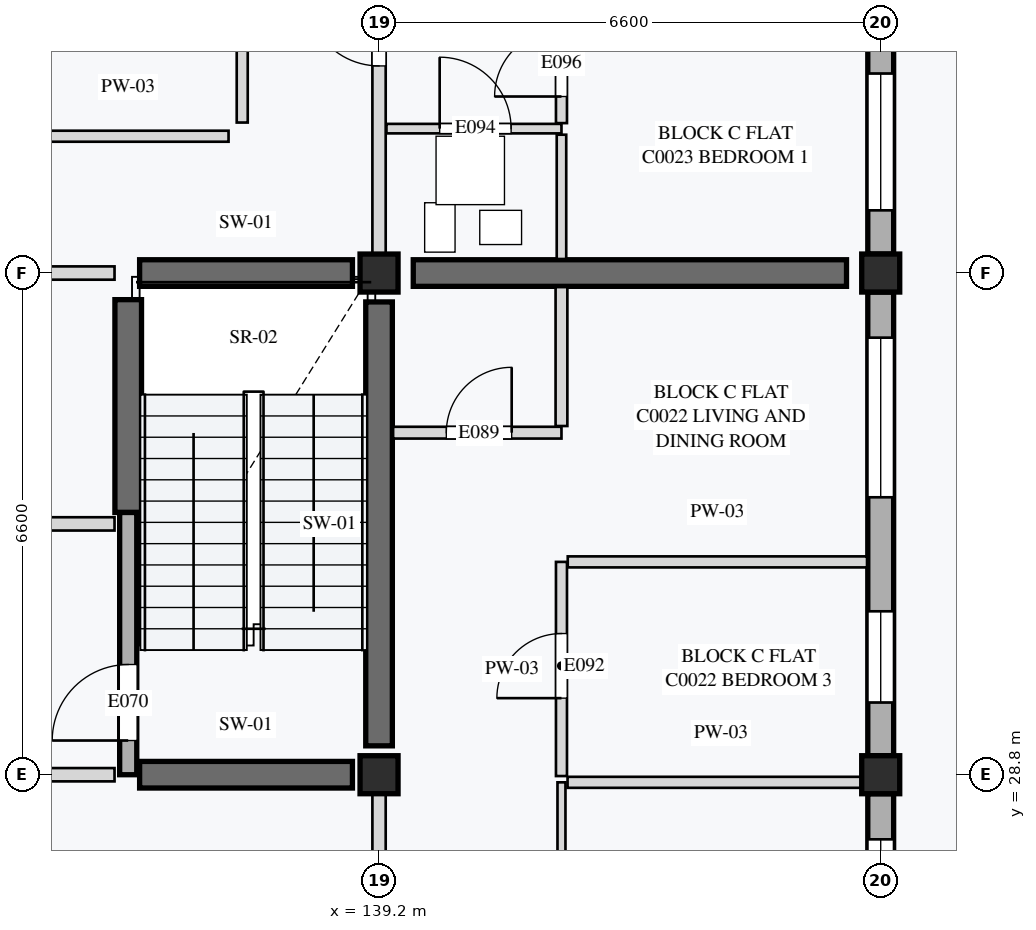
"""IFC4 building model, lengths in metres.
Left out: names, types, materials, properties, quantities, classifications, styles, units other than length and angle.
Written with IfcOpenShell. Run it as: python <this file> out.ifc"""

import sys

from ifc_helpers import new_model, si_unit, direction, frame, frame_2d, origin, origin_2d, place, context, subcontext, project, spatial, rectangle, extrude, element, fill, save


model = new_model("IFC4")
c1 = context("Model", 3, precision=1e-05, world=origin(), true_north=direction((0.0, 1.0)))
c2 = subcontext(c1, "Body", "Model", "MODEL_VIEW")
j1 = project(units=[si_unit("LENGTHUNIT", "METRE"), si_unit("PLANEANGLEUNIT", "RADIAN")], contexts=[c1])
p1 = place(None, origin())
s1 = spatial("IfcSite", under=j1, at=p1, CompositionType="ELEMENT")
p2 = place(p1, origin())
s2 = spatial("IfcBuilding", under=s1, at=p2, CompositionType="ELEMENT")
p3 = place(p2, origin())
s3 = spatial("IfcBuildingStorey", under=s2, at=p3, CompositionType="ELEMENT", Elevation=0.0)
for number, where, z_axis, x_axis in (
    (1, (139.2, 28.8, 0.0), (0.0, 0.0, 1.0), (1.0, 0.0, 0.0)),
    (2, (145.8, 28.8, 0.0), (0.0, 0.0, 1.0), (1.0, 0.0, 0.0)),
    (3, (139.2, 35.4, 0.0), (0.0, 0.0, 1.0), (1.0, 0.0, 0.0)),
    (4, (145.8, 35.4, 0.0), (0.0, 0.0, 1.0), (1.0, 0.0, 0.0)),
):
    element("IfcColumn", number, at=place(p3, frame(where, z_axis=z_axis, x_axis=x_axis)), inside=s3, PredefinedType="COLUMN", context=c2, shape_type="SweptSolid", body=[
        extrude(rectangle(XDim=0.5, YDim=0.5, at=origin_2d()), origin(), (0.0, 0.0, 1.0), 4.2),
    ])
p4 = place(p3, frame((139.2, 29.18, 0.0), z_axis=(0.0, 0.0, 1.0), x_axis=(0.0, 1.0, 0.0)))
e5 = element("IfcWall", 5, at=p4, inside=s3, PredefinedType="SHEAR", context=c2, shape_type="SweptSolid", body=[
    extrude(rectangle(XDim=5.84, YDim=0.35, at=frame_2d((2.92, 0.0))), origin(), (0.0, 0.0, 1.0), 3.92),
])
for number, where, z_axis, x_axis in (
    (6, (135.9, 32.25, 0.0), (0.0, 0.0, 1.0), (0.0, 1.0, 0.0)),
    (7, (136.05, 28.8, 0.0), (0.0, 0.0, 1.0), (1.0, 0.0, 0.0)),
    (8, (136.05, 35.4, 0.0), (0.0, 0.0, 1.0), (1.0, 0.0, 0.0)),
):
    element("IfcWall", number, at=place(p3, frame(where, z_axis=z_axis, x_axis=x_axis)), inside=s3, PredefinedType="SHEAR", context=c2, shape_type="SweptSolid", body=[
        extrude(rectangle(XDim=2.8, YDim=0.35, at=frame_2d((1.4, 0.0))), origin(), (0.0, 0.0, 1.0), 3.92),
    ])
p5 = place(p3, frame((139.65, 35.4, 0.0), z_axis=(0.0, 0.0, 1.0), x_axis=(1.0, 0.0, 0.0)))
e9 = element("IfcWall", 9, at=p5, inside=s3, PredefinedType="SHEAR", context=c2, shape_type="SweptSolid", body=[
    extrude(rectangle(XDim=5.7, YDim=0.35, at=frame_2d((2.85, 0.0))), origin(), (0.0, 0.0, 1.0), 3.92),
])
p6 = place(p3, frame((145.8, 22.45, 0.0), z_axis=(0.0, 0.0, 1.0), x_axis=(0.0, 1.0, 0.0)))
e10 = element("IfcWall", 10, at=p6, inside=s3, PredefinedType="STANDARD", context=c2, shape_type="SweptSolid", body=[
    extrude(rectangle(XDim=6.1, YDim=0.34, at=frame_2d((3.05, 0.0))), origin(), (0.0, 0.0, 1.0), 3.6),
])
p7 = place(p6, frame((0.6, 0.0, 0.85)))
e11 = element("IfcOpeningElement", 11, at=p7, cuts=e10, PredefinedType="OPENING", context=c2, shape_type="SweptSolid", body=[
    extrude(rectangle(XDim=1.8, YDim=1.35, at=frame_2d((0.9, 0.675))), frame((0.0, 0.18, 0.0), z_axis=(0.0, -1.0, 0.0), x_axis=(1.0, 0.0, 0.0)), (0.0, 0.0, 1.0), 0.36),
])
p8 = place(p6, frame((4.0, 0.0, 0.85)))
e12 = element("IfcOpeningElement", 12, at=p8, cuts=e10, PredefinedType="OPENING", context=c2, shape_type="SweptSolid", body=[
    extrude(rectangle(XDim=1.5, YDim=1.35, at=frame_2d((0.75, 0.675))), frame((0.0, 0.18, 0.0), z_axis=(0.0, -1.0, 0.0), x_axis=(1.0, 0.0, 0.0)), (0.0, 0.0, 1.0), 0.36),
])
p9 = place(p3, frame((145.8, 29.05, 0.0), z_axis=(0.0, 0.0, 1.0), x_axis=(0.0, 1.0, 0.0)))
e13 = element("IfcWall", 13, at=p9, inside=s3, PredefinedType="STANDARD", context=c2, shape_type="SweptSolid", body=[
    extrude(rectangle(XDim=6.1, YDim=0.34, at=frame_2d((3.05, 0.0))), origin(), (0.0, 0.0, 1.0), 3.6),
])
p10 = place(p9, frame((0.7, 0.0, 0.85)))
e14 = element("IfcOpeningElement", 14, at=p10, cuts=e13, PredefinedType="OPENING", context=c2, shape_type="SweptSolid", body=[
    extrude(rectangle(XDim=1.2, YDim=1.35, at=frame_2d((0.6, 0.675))), frame((0.0, 0.18, 0.0), z_axis=(0.0, -1.0, 0.0), x_axis=(1.0, 0.0, 0.0)), (0.0, 0.0, 1.0), 0.36),
])
p11 = place(p9, frame((3.4, 0.0, 0.85)))
e15 = element("IfcOpeningElement", 15, at=p11, cuts=e13, PredefinedType="OPENING", context=c2, shape_type="SweptSolid", body=[
    extrude(rectangle(XDim=2.1, YDim=1.55, at=frame_2d((1.05, 0.775))), frame((0.0, 0.18, 0.0), z_axis=(0.0, -1.0, 0.0), x_axis=(1.0, 0.0, 0.0)), (0.0, 0.0, 1.0), 0.36),
])
p12 = place(p3, frame((145.8, 35.65, 0.0), z_axis=(0.0, 0.0, 1.0), x_axis=(0.0, 1.0, 0.0)))
e16 = element("IfcWall", 16, at=p12, inside=s3, PredefinedType="STANDARD", context=c2, shape_type="SweptSolid", body=[
    extrude(rectangle(XDim=6.1, YDim=0.34, at=frame_2d((3.05, 0.0))), origin(), (0.0, 0.0, 1.0), 3.6),
])
p13 = place(p12, frame((0.575, 0.0, 0.85)))
e17 = element("IfcOpeningElement", 17, at=p13, cuts=e16, PredefinedType="OPENING", context=c2, shape_type="SweptSolid", body=[
    extrude(rectangle(XDim=1.8, YDim=1.35, at=frame_2d((0.9, 0.675))), frame((0.0, 0.18, 0.0), z_axis=(0.0, -1.0, 0.0), x_axis=(1.0, 0.0, 0.0)), (0.0, 0.0, 1.0), 0.36),
])
p14 = place(p12, frame((3.875, 0.0, 0.85)))
e18 = element("IfcOpeningElement", 18, at=p14, cuts=e16, PredefinedType="OPENING", context=c2, shape_type="SweptSolid", body=[
    extrude(rectangle(XDim=1.8, YDim=1.55, at=frame_2d((0.9, 0.775))), frame((0.0, 0.18, 0.0), z_axis=(0.0, -1.0, 0.0), x_axis=(1.0, 0.0, 0.0)), (0.0, 0.0, 1.0), 0.36),
])
p15 = place(p3, frame((135.9, 28.8, 0.0), z_axis=(0.0, 0.0, 1.0), x_axis=(0.0, 1.0, 0.0)))
e19 = element("IfcWall", 19, at=p15, inside=s3, PredefinedType="STANDARD", context=c2, shape_type="SweptSolid", body=[
    extrude(rectangle(XDim=3.45, YDim=0.225, at=frame_2d((1.725, 0.0))), origin(), (0.0, 0.0, 1.0), 3.92),
])
p16 = place(p15, frame((0.45, 0.0, 0.0)))
e20 = element("IfcOpeningElement", 20, at=p16, cuts=e19, PredefinedType="OPENING", context=c2, shape_type="SweptSolid", body=[
    extrude(rectangle(XDim=1.0, YDim=2.16, at=frame_2d((0.5, 1.08))), frame((0.0, 0.123, 0.0), z_axis=(0.0, -1.0, 0.0), x_axis=(1.0, 0.0, 0.0)), (0.0, 0.0, 1.0), 0.245),
])
p17 = place(p3, frame((134.58, 28.8, 0.0), z_axis=(0.0, 0.0, 1.0), x_axis=(1.0, 0.0, 0.0)))
e21 = element("IfcWall", 21, at=p17, inside=s3, PredefinedType="PARTITIONING", context=c2, shape_type="SweptSolid", body=[
    extrude(rectangle(XDim=1.14, YDim=0.175, at=frame_2d((0.57, 0.0))), origin(), (0.0, 0.0, 1.0), 3.75),
])
for number, where, z_axis, x_axis in (
    (22, (134.58, 32.1, 0.0), (0.0, 0.0, 1.0), (1.0, 0.0, 0.0)),
    (23, (134.58, 35.4, 0.0), (0.0, 0.0, 1.0), (1.0, 0.0, 0.0)),
):
    element("IfcWall", number, at=place(p3, frame(where, z_axis=z_axis, x_axis=x_axis)), inside=s3, PredefinedType="PARTITIONING", context=c2, shape_type="SweptSolid", body=[
        extrude(rectangle(XDim=1.14, YDim=0.175, at=frame_2d((0.57, 0.0))), origin(), (0.0, 0.0, 1.0), 3.92),
    ])
p18 = place(p3, frame((137.4, 37.38, 0.0), z_axis=(0.0, 0.0, 1.0), x_axis=(0.0, 1.0, 0.0)))
e24 = element("IfcWall", 24, at=p18, inside=s3, PredefinedType="PARTITIONING", context=c2, shape_type="SweptSolid", body=[
    extrude(rectangle(XDim=4.6, YDim=0.145, at=frame_2d((2.3, 0.0))), origin(), (0.0, 0.0, 1.0), 3.92),
])
p19 = place(p3, frame((134.58, 37.2, 0.0), z_axis=(0.0, 0.0, 1.0), x_axis=(1.0, 0.0, 0.0)))
e25 = element("IfcWall", 25, at=p19, inside=s3, PredefinedType="PARTITIONING", context=c2, shape_type="SweptSolid", body=[
    extrude(rectangle(XDim=2.64, YDim=0.145, at=frame_2d((1.32, 0.0))), origin(), (0.0, 0.0, 1.0), 3.92),
])
p20 = place(p3, frame((139.2, 22.2, 0.0), z_axis=(0.0, 0.0, 1.0), x_axis=(0.0, 1.0, 0.0)))
e26 = element("IfcWall", 26, at=p20, inside=s3, PredefinedType="PARTITIONING", context=c2, shape_type="SweptSolid", body=[
    extrude(rectangle(XDim=6.6, YDim=0.175, at=frame_2d((3.3, 0.0))), origin(), (0.0, 0.0, 1.0), 3.55),
])
p21 = place(p20, frame((3.85, 0.0, 0.0)))
e27 = element("IfcOpeningElement", 27, at=p21, cuts=e26, PredefinedType="OPENING", context=c2, shape_type="SweptSolid", body=[
    extrude(rectangle(XDim=0.92, YDim=2.14, at=frame_2d((0.46, 1.07))), frame((0.0, 0.097, 0.0), z_axis=(0.0, -1.0, 0.0), x_axis=(1.0, 0.0, 0.0)), (0.0, 0.0, 1.0), 0.195),
])
p22 = place(p3, frame((139.385, 33.3, 0.0), z_axis=(0.0, 0.0, 1.0), x_axis=(1.0, 0.0, 0.0)))
e28 = element("IfcWall", 28, at=p22, inside=s3, PredefinedType="PARTITIONING", context=c2, shape_type="SweptSolid", body=[
    extrude(rectangle(XDim=2.215, YDim=0.155, at=frame_2d((1.107, 0.0))), origin(), (0.0, 0.0, 1.0), 3.92),
])
p23 = place(p22, frame((0.7, 0.0, 0.0)))
e29 = element("IfcOpeningElement", 29, at=p23, cuts=e28, PredefinedType="OPENING", context=c2, shape_type="SweptSolid", body=[
    extrude(rectangle(XDim=0.86, YDim=2.12, at=frame_2d((0.43, 1.06))), frame((0.0, 0.087, 0.0), z_axis=(0.0, -1.0, 0.0), x_axis=(1.0, 0.0, 0.0)), (0.0, 0.0, 1.0), 0.175),
])
p24 = place(p3, frame((141.6, 33.387, 0.0), z_axis=(0.0, 0.0, 1.0), x_axis=(0.0, 1.0, 0.0)))
e30 = element("IfcWall", 30, at=p24, inside=s3, PredefinedType="PARTITIONING", context=c2, shape_type="SweptSolid", body=[
    extrude(rectangle(XDim=1.828, YDim=0.155, at=frame_2d((0.914, 0.0))), origin(), (0.0, 0.0, 1.0), 3.92),
])
p25 = place(p3, frame((141.6, 25.7, 0.0), z_axis=(0.0, 0.0, 1.0), x_axis=(0.0, 1.0, 0.0)))
e31 = element("IfcWall", 31, at=p25, inside=s3, PredefinedType="PARTITIONING", context=c2, shape_type="SweptSolid", body=[
    extrude(rectangle(XDim=3.0, YDim=0.105, at=frame_2d((1.5, 0.0))), origin(), (0.0, 0.0, 1.0), 3.92),
])
p26 = place(p25, frame((1.075, 0.0, 0.0)))
e32 = element("IfcOpeningElement", 32, at=p26, cuts=e31, PredefinedType="OPENING", context=c2, shape_type="SweptSolid", body=[
    extrude(rectangle(XDim=0.87, YDim=2.08, at=frame_2d((0.435, 1.04))), frame((0.0, 0.062, 0.0), z_axis=(0.0, -1.0, 0.0), x_axis=(1.0, 0.0, 0.0)), (0.0, 0.0, 1.0), 0.125),
])
p27 = place(p3, frame((141.68, 28.7, 0.0), z_axis=(0.0, 0.0, 1.0), x_axis=(1.0, 0.0, 0.0)))
e33 = element("IfcWall", 33, at=p27, inside=s3, PredefinedType="PARTITIONING", context=c2, shape_type="SweptSolid", body=[
    extrude(rectangle(XDim=4.04, YDim=0.145, at=frame_2d((2.02, 0.0))), origin(), (0.0, 0.0, 1.0), 3.75),
])
p28 = place(p3, frame((141.6, 28.782, 0.0), z_axis=(0.0, 0.0, 1.0), x_axis=(0.0, 1.0, 0.0)))
e34 = element("IfcWall", 34, at=p28, inside=s3, PredefinedType="PARTITIONING", context=c2, shape_type="SweptSolid", body=[
    extrude(rectangle(XDim=2.818, YDim=0.145, at=frame_2d((1.409, 0.0))), origin(), (0.0, 0.0, 1.0), 3.92),
])
p29 = place(p28, frame((1.025, 0.0, 0.0)))
e35 = element("IfcOpeningElement", 35, at=p29, cuts=e34, PredefinedType="OPENING", context=c2, shape_type="SweptSolid", body=[
    extrude(rectangle(XDim=0.85, YDim=2.1, at=frame_2d((0.425, 1.05))), frame((0.0, 0.083, 0.0), z_axis=(0.0, -1.0, 0.0), x_axis=(1.0, 0.0, 0.0)), (0.0, 0.0, 1.0), 0.165),
])
p30 = place(p3, frame((141.683, 31.6, 0.0), z_axis=(0.0, 0.0, 1.0), x_axis=(1.0, 0.0, 0.0)))
e36 = element("IfcWall", 36, at=p30, inside=s3, PredefinedType="PARTITIONING", context=c2, shape_type="SweptSolid", body=[
    extrude(rectangle(XDim=3.938, YDim=0.145, at=frame_2d((1.969, 0.0))), origin(), (0.0, 0.0, 1.0), 3.92),
])
p31 = place(p3, frame((139.2, 35.4, 0.0), z_axis=(0.0, 0.0, 1.0), x_axis=(0.0, 1.0, 0.0)))
e37 = element("IfcWall", 37, at=p31, inside=s3, PredefinedType="PARTITIONING", context=c2, shape_type="SweptSolid", body=[
    extrude(rectangle(XDim=6.6, YDim=0.175, at=frame_2d((3.3, 0.0))), origin(), (0.0, 0.0, 1.0), 3.55),
])
p32 = place(p31, frame((2.725, 0.0, 0.0)))
e38 = element("IfcOpeningElement", 38, at=p32, cuts=e37, PredefinedType="OPENING", context=c2, shape_type="SweptSolid", body=[
    extrude(rectangle(XDim=0.95, YDim=2.1, at=frame_2d((0.475, 1.05))), frame((0.0, 0.097, 0.0), z_axis=(0.0, -1.0, 0.0), x_axis=(1.0, 0.0, 0.0)), (0.0, 0.0, 1.0), 0.195),
])
p33 = place(p3, frame((139.298, 37.3, 0.0), z_axis=(0.0, 0.0, 1.0), x_axis=(1.0, 0.0, 0.0)))
e39 = element("IfcWall", 39, at=p33, inside=s3, PredefinedType="PARTITIONING", context=c2, shape_type="SweptSolid", body=[
    extrude(rectangle(XDim=2.302, YDim=0.125, at=frame_2d((1.151, 0.0))), origin(), (0.0, 0.0, 1.0), 3.92),
])
p34 = place(p33, frame((0.7, 0.0, 0.0)))
e40 = element("IfcOpeningElement", 40, at=p34, cuts=e39, PredefinedType="OPENING", context=c2, shape_type="SweptSolid", body=[
    extrude(rectangle(XDim=0.94, YDim=2.08, at=frame_2d((0.47, 1.04))), frame((0.0, 0.073, 0.0), z_axis=(0.0, -1.0, 0.0), x_axis=(1.0, 0.0, 0.0)), (0.0, 0.0, 1.0), 0.145),
])
p35 = place(p3, frame((141.6, 35.585, 0.0), z_axis=(0.0, 0.0, 1.0), x_axis=(0.0, 1.0, 0.0)))
e41 = element("IfcWall", 41, at=p35, inside=s3, PredefinedType="PARTITIONING", context=c2, shape_type="SweptSolid", body=[
    extrude(rectangle(XDim=1.635, YDim=0.125, at=frame_2d((0.817, 0.0))), origin(), (0.0, 0.0, 1.0), 3.92),
])
p36 = place(p3, frame((141.6, 37.373, 0.0), z_axis=(0.0, 0.0, 1.0), x_axis=(0.0, 1.0, 0.0)))
e42 = element("IfcWall", 42, at=p36, inside=s3, PredefinedType="PARTITIONING", context=c2, shape_type="SweptSolid", body=[
    extrude(rectangle(XDim=1.478, YDim=0.145, at=frame_2d((0.739, 0.0))), origin(), (0.0, 0.0, 1.0), 3.92),
])
p37 = place(p36, frame((0.35, 0.0, 0.0)))
e43 = element("IfcOpeningElement", 43, at=p37, cuts=e42, PredefinedType="OPENING", context=c2, shape_type="SweptSolid", body=[
    extrude(rectangle(XDim=0.88, YDim=2.1, at=frame_2d((0.44, 1.05))), frame((0.0, 0.083, 0.0), z_axis=(0.0, -1.0, 0.0), x_axis=(1.0, 0.0, 0.0)), (0.0, 0.0, 1.0), 0.165),
])
p38 = place(p8, origin())
e44 = element("IfcWindow", 44, at=p38, inside=s3, PartitioningType="SINGLE_PANEL", PredefinedType="WINDOW", context=c2, shape_type="SweptSolid", body=[
    extrude(rectangle(XDim=1.5, YDim=1.35, at=frame_2d((0.75, 0.675))), frame((0.0, 0.03, 0.0), z_axis=(0.0, -1.0, 0.0), x_axis=(1.0, 0.0, 0.0)), (0.0, 0.0, 1.0), 0.06),
])
fill(e12, e44)
p39 = place(p10, origin())
e45 = element("IfcWindow", 45, at=p39, inside=s3, PartitioningType="SINGLE_PANEL", PredefinedType="WINDOW", context=c2, shape_type="SweptSolid", body=[
    extrude(rectangle(XDim=1.2, YDim=1.35, at=frame_2d((0.6, 0.675))), frame((0.0, 0.03, 0.0), z_axis=(0.0, -1.0, 0.0), x_axis=(1.0, 0.0, 0.0)), (0.0, 0.0, 1.0), 0.06),
])
fill(e14, e45)
p40 = place(p11, origin())
e46 = element("IfcWindow", 46, at=p40, inside=s3, PartitioningType="SINGLE_PANEL", PredefinedType="WINDOW", context=c2, shape_type="SweptSolid", body=[
    extrude(rectangle(XDim=2.1, YDim=1.55, at=frame_2d((1.05, 0.775))), frame((0.0, 0.03, 0.0), z_axis=(0.0, -1.0, 0.0), x_axis=(1.0, 0.0, 0.0)), (0.0, 0.0, 1.0), 0.06),
])
fill(e15, e46)
p41 = place(p13, origin())
e47 = element("IfcWindow", 47, at=p41, inside=s3, PartitioningType="SINGLE_PANEL", PredefinedType="WINDOW", context=c2, shape_type="SweptSolid", body=[
    extrude(rectangle(XDim=1.8, YDim=1.35, at=frame_2d((0.9, 0.675))), frame((0.0, 0.03, 0.0), z_axis=(0.0, -1.0, 0.0), x_axis=(1.0, 0.0, 0.0)), (0.0, 0.0, 1.0), 0.06),
])
fill(e17, e47)
p42 = place(p16, origin())
e48 = element("IfcDoor", 48, at=p42, inside=s3, OperationType="SINGLE_SWING_LEFT", PredefinedType="DOOR", context=c2, shape_type="SweptSolid", body=[
    extrude(rectangle(XDim=1.0, YDim=2.16, at=frame_2d((0.5, 1.08))), frame((0.0, 0.025, 0.0), z_axis=(0.0, -1.0, 0.0), x_axis=(1.0, 0.0, 0.0)), (0.0, 0.0, 1.0), 0.05),
])
fill(e20, e48)
p43 = place(p23, origin())
e49 = element("IfcDoor", 49, at=p43, inside=s3, OperationType="SINGLE_SWING_RIGHT", PredefinedType="DOOR", context=c2, shape_type="SweptSolid", body=[
    extrude(rectangle(XDim=0.86, YDim=2.12, at=frame_2d((0.43, 1.06))), frame((0.0, 0.025, 0.0), z_axis=(0.0, -1.0, 0.0), x_axis=(1.0, 0.0, 0.0)), (0.0, 0.0, 1.0), 0.05),
])
fill(e29, e49)
p44 = place(p29, origin())
e50 = element("IfcDoor", 50, at=p44, inside=s3, OperationType="SINGLE_SWING_LEFT", PredefinedType="DOOR", context=c2, shape_type="SweptSolid", body=[
    extrude(rectangle(XDim=0.85, YDim=2.1, at=frame_2d((0.425, 1.05))), frame((0.0, 0.025, 0.0), z_axis=(0.0, -1.0, 0.0), x_axis=(1.0, 0.0, 0.0)), (0.0, 0.0, 1.0), 0.05),
])
fill(e35, e50)
p45 = place(p32, origin())
e51 = element("IfcDoor", 51, at=p45, inside=s3, OperationType="SINGLE_SWING_RIGHT", PredefinedType="DOOR", context=c2, shape_type="SweptSolid", body=[
    extrude(rectangle(XDim=0.95, YDim=2.1, at=frame_2d((0.475, 1.05))), frame((0.0, 0.025, 0.0), z_axis=(0.0, -1.0, 0.0), x_axis=(1.0, 0.0, 0.0)), (0.0, 0.0, 1.0), 0.05),
])
fill(e38, e51)
p46 = place(p34, origin())
e52 = element("IfcDoor", 52, at=p46, inside=s3, OperationType="SINGLE_SWING_LEFT", PredefinedType="DOOR", context=c2, shape_type="SweptSolid", body=[
    extrude(rectangle(XDim=0.94, YDim=2.08, at=frame_2d((0.47, 1.04))), frame((0.0, 0.025, 0.0), z_axis=(0.0, -1.0, 0.0), x_axis=(1.0, 0.0, 0.0)), (0.0, 0.0, 1.0), 0.05),
])
fill(e40, e52)
p47 = place(p37, origin())
e53 = element("IfcDoor", 53, at=p47, inside=s3, OperationType="SINGLE_SWING_LEFT", PredefinedType="DOOR", context=c2, shape_type="SweptSolid", body=[
    extrude(rectangle(XDim=0.88, YDim=2.1, at=frame_2d((0.44, 1.05))), frame((0.0, 0.025, 0.0), z_axis=(0.0, -1.0, 0.0), x_axis=(1.0, 0.0, 0.0)), (0.0, 0.0, 1.0), 0.05),
])
fill(e43, e53)
save(model, sys.argv[1])
